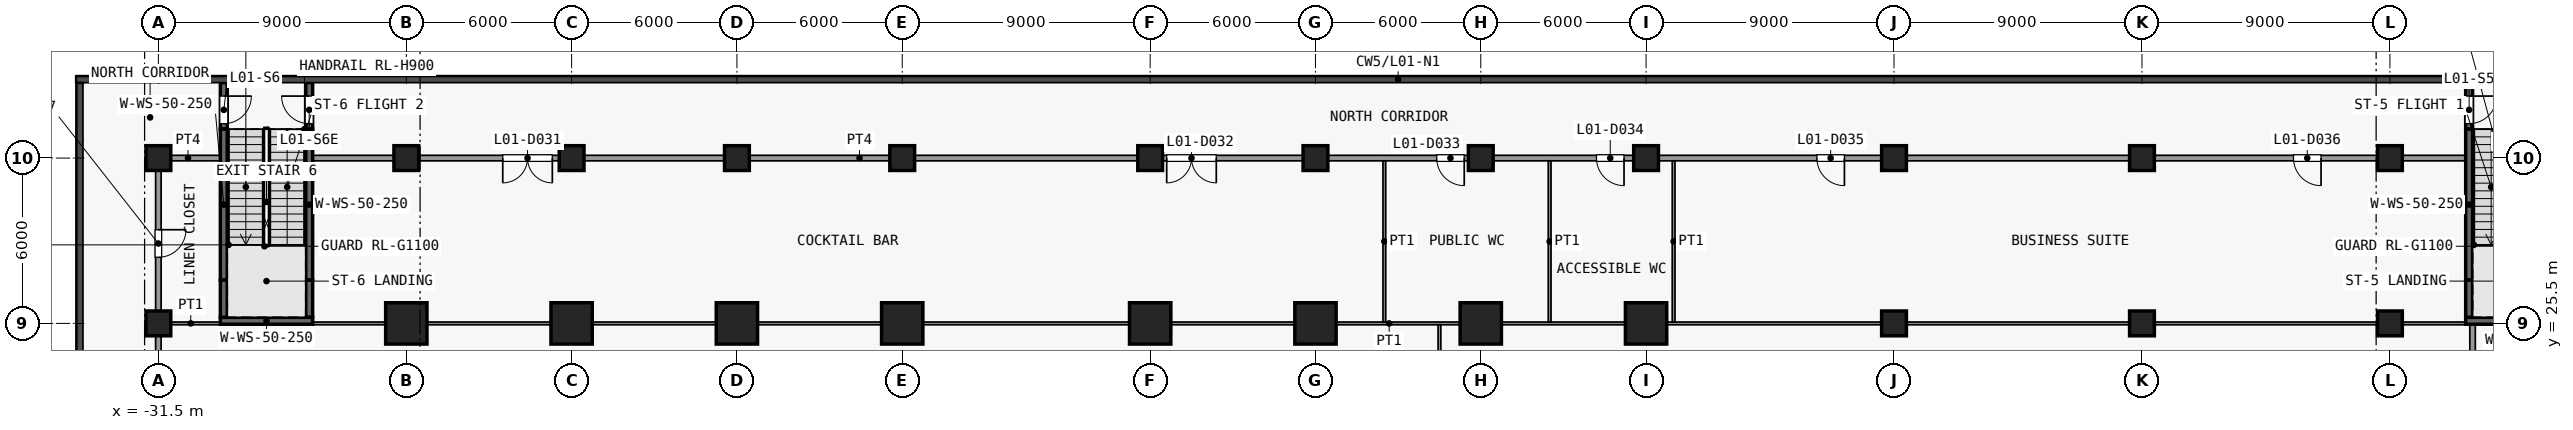
"""IFC4 building model, lengths in metres.
Left out: names, types, materials, properties, quantities, classifications, styles, units other than length and angle.
Written with IfcOpenShell. Run it as: python <this file> out.ifc"""

import sys

from ifc_helpers import new_model, si_unit, direction, frame, frame_2d, origin, origin_2d, place, context, subcontext, project, spatial, rectangle, extrude, element, fill, save


model = new_model("IFC4")
c1 = context("Model", 3, precision=1e-05, world=origin(), true_north=direction((0.0, 1.0)))
c2 = subcontext(c1, "Body", "Model", "MODEL_VIEW")
j1 = project(units=[si_unit("LENGTHUNIT", "METRE"), si_unit("PLANEANGLEUNIT", "RADIAN")], contexts=[c1])
p1 = place(None, origin())
s1 = spatial("IfcSite", under=j1, at=p1, CompositionType="ELEMENT")
p2 = place(p1, origin())
s2 = spatial("IfcBuilding", under=s1, at=p2, CompositionType="ELEMENT")
p3 = place(p2, frame((0.0, 0.0, 8.0)))
s3 = spatial("IfcBuildingStorey", under=s2, at=p3, CompositionType="ELEMENT", Elevation=8.0)
for number, where, z_axis, x_axis in (
    (1, (-31.5, 25.5, 0.0), (0.0, 0.0, 1.0), (1.0, 0.0, 0.0)),
    (2, (-31.5, 31.5, 0.0), (0.0, 0.0, 1.0), (1.0, 0.0, 0.0)),
):
    element("IfcColumn", number, at=place(p3, frame(where, z_axis=z_axis, x_axis=x_axis)), inside=s3, PredefinedType="COLUMN", context=c2, shape_type="SweptSolid", body=[
        extrude(rectangle(XDim=0.9, YDim=0.9, at=origin_2d()), origin(), (0.0, 0.0, 1.0), 5.5),
    ])
p4 = place(p3, frame((-22.5, 25.5, 0.0), z_axis=(0.0, 0.0, 1.0), x_axis=(1.0, 0.0, 0.0)))
e3 = element("IfcColumn", 3, at=p4, inside=s3, PredefinedType="COLUMN", context=c2, shape_type="SweptSolid", body=[
    extrude(rectangle(XDim=1.5, YDim=1.5, at=origin_2d()), origin(), (0.0, 0.0, 1.0), 5.5),
])
p5 = place(p3, frame((-22.5, 31.5, 0.0), z_axis=(0.0, 0.0, 1.0), x_axis=(1.0, 0.0, 0.0)))
e4 = element("IfcColumn", 4, at=p5, inside=s3, PredefinedType="COLUMN", context=c2, shape_type="SweptSolid", body=[
    extrude(rectangle(XDim=0.9, YDim=0.9, at=origin_2d()), origin(), (0.0, 0.0, 1.0), 5.5),
])
p6 = place(p3, frame((-16.5, 25.5, 0.0), z_axis=(0.0, 0.0, 1.0), x_axis=(1.0, 0.0, 0.0)))
e5 = element("IfcColumn", 5, at=p6, inside=s3, PredefinedType="COLUMN", context=c2, shape_type="SweptSolid", body=[
    extrude(rectangle(XDim=1.5, YDim=1.5, at=origin_2d()), origin(), (0.0, 0.0, 1.0), 5.5),
])
p7 = place(p3, frame((-16.5, 31.5, 0.0), z_axis=(0.0, 0.0, 1.0), x_axis=(1.0, 0.0, 0.0)))
e6 = element("IfcColumn", 6, at=p7, inside=s3, PredefinedType="COLUMN", context=c2, shape_type="SweptSolid", body=[
    extrude(rectangle(XDim=0.9, YDim=0.9, at=origin_2d()), origin(), (0.0, 0.0, 1.0), 5.5),
])
p8 = place(p3, frame((-10.5, 25.5, 0.0), z_axis=(0.0, 0.0, 1.0), x_axis=(1.0, 0.0, 0.0)))
e7 = element("IfcColumn", 7, at=p8, inside=s3, PredefinedType="COLUMN", context=c2, shape_type="SweptSolid", body=[
    extrude(rectangle(XDim=1.5, YDim=1.5, at=origin_2d()), origin(), (0.0, 0.0, 1.0), 5.5),
])
p9 = place(p3, frame((-10.5, 31.5, 0.0), z_axis=(0.0, 0.0, 1.0), x_axis=(1.0, 0.0, 0.0)))
e8 = element("IfcColumn", 8, at=p9, inside=s3, PredefinedType="COLUMN", context=c2, shape_type="SweptSolid", body=[
    extrude(rectangle(XDim=0.9, YDim=0.9, at=origin_2d()), origin(), (0.0, 0.0, 1.0), 5.5),
])
p10 = place(p3, frame((-4.5, 25.5, 0.0), z_axis=(0.0, 0.0, 1.0), x_axis=(1.0, 0.0, 0.0)))
e9 = element("IfcColumn", 9, at=p10, inside=s3, PredefinedType="COLUMN", context=c2, shape_type="SweptSolid", body=[
    extrude(rectangle(XDim=1.5, YDim=1.5, at=origin_2d()), origin(), (0.0, 0.0, 1.0), 5.5),
])
p11 = place(p3, frame((-4.5, 31.5, 0.0), z_axis=(0.0, 0.0, 1.0), x_axis=(1.0, 0.0, 0.0)))
e10 = element("IfcColumn", 10, at=p11, inside=s3, PredefinedType="COLUMN", context=c2, shape_type="SweptSolid", body=[
    extrude(rectangle(XDim=0.9, YDim=0.9, at=origin_2d()), origin(), (0.0, 0.0, 1.0), 5.5),
])
p12 = place(p3, frame((4.5, 25.5, 0.0), z_axis=(0.0, 0.0, 1.0), x_axis=(1.0, 0.0, 0.0)))
e11 = element("IfcColumn", 11, at=p12, inside=s3, PredefinedType="COLUMN", context=c2, shape_type="SweptSolid", body=[
    extrude(rectangle(XDim=1.5, YDim=1.5, at=origin_2d()), origin(), (0.0, 0.0, 1.0), 5.5),
])
p13 = place(p3, frame((4.5, 31.5, 0.0), z_axis=(0.0, 0.0, 1.0), x_axis=(1.0, 0.0, 0.0)))
e12 = element("IfcColumn", 12, at=p13, inside=s3, PredefinedType="COLUMN", context=c2, shape_type="SweptSolid", body=[
    extrude(rectangle(XDim=0.9, YDim=0.9, at=origin_2d()), origin(), (0.0, 0.0, 1.0), 5.5),
])
p14 = place(p3, frame((10.5, 25.5, 0.0), z_axis=(0.0, 0.0, 1.0), x_axis=(1.0, 0.0, 0.0)))
e13 = element("IfcColumn", 13, at=p14, inside=s3, PredefinedType="COLUMN", context=c2, shape_type="SweptSolid", body=[
    extrude(rectangle(XDim=1.5, YDim=1.5, at=origin_2d()), origin(), (0.0, 0.0, 1.0), 5.5),
])
p15 = place(p3, frame((10.5, 31.5, 0.0), z_axis=(0.0, 0.0, 1.0), x_axis=(1.0, 0.0, 0.0)))
e14 = element("IfcColumn", 14, at=p15, inside=s3, PredefinedType="COLUMN", context=c2, shape_type="SweptSolid", body=[
    extrude(rectangle(XDim=0.9, YDim=0.9, at=origin_2d()), origin(), (0.0, 0.0, 1.0), 5.5),
])
p16 = place(p3, frame((16.5, 25.5, 0.0), z_axis=(0.0, 0.0, 1.0), x_axis=(1.0, 0.0, 0.0)))
e15 = element("IfcColumn", 15, at=p16, inside=s3, PredefinedType="COLUMN", context=c2, shape_type="SweptSolid", body=[
    extrude(rectangle(XDim=1.5, YDim=1.5, at=origin_2d()), origin(), (0.0, 0.0, 1.0), 5.5),
])
p17 = place(p3, frame((16.5, 31.5, 0.0), z_axis=(0.0, 0.0, 1.0), x_axis=(1.0, 0.0, 0.0)))
e16 = element("IfcColumn", 16, at=p17, inside=s3, PredefinedType="COLUMN", context=c2, shape_type="SweptSolid", body=[
    extrude(rectangle(XDim=0.9, YDim=0.9, at=origin_2d()), origin(), (0.0, 0.0, 1.0), 5.5),
])
p18 = place(p3, frame((22.5, 25.5, 0.0), z_axis=(0.0, 0.0, 1.0), x_axis=(1.0, 0.0, 0.0)))
e17 = element("IfcColumn", 17, at=p18, inside=s3, PredefinedType="COLUMN", context=c2, shape_type="SweptSolid", body=[
    extrude(rectangle(XDim=1.5, YDim=1.5, at=origin_2d()), origin(), (0.0, 0.0, 1.0), 5.5),
])
for number, where, z_axis, x_axis in (
    (18, (22.5, 31.5, 0.0), (0.0, 0.0, 1.0), (1.0, 0.0, 0.0)),
    (19, (31.5, 25.5, 0.0), (0.0, 0.0, 1.0), (1.0, 0.0, 0.0)),
    (20, (31.5, 31.5, 0.0), (0.0, 0.0, 1.0), (1.0, 0.0, 0.0)),
    (21, (40.5, 25.5, 0.0), (0.0, 0.0, 1.0), (1.0, 0.0, 0.0)),
    (22, (40.5, 31.5, 0.0), (0.0, 0.0, 1.0), (1.0, 0.0, 0.0)),
    (23, (49.5, 25.5, 0.0), (0.0, 0.0, 1.0), (1.0, 0.0, 0.0)),
    (24, (49.5, 31.5, 0.0), (0.0, 0.0, 1.0), (1.0, 0.0, 0.0)),
):
    element("IfcColumn", number, at=place(p3, frame(where, z_axis=z_axis, x_axis=x_axis)), inside=s3, PredefinedType="COLUMN", context=c2, shape_type="SweptSolid", body=[
        extrude(rectangle(XDim=0.9, YDim=0.9, at=origin_2d()), origin(), (0.0, 0.0, 1.0), 5.5),
    ])
p19 = place(p3, frame((52.375, 34.24, 0.0), z_axis=(0.0, 0.0, 1.0), x_axis=(0.0, -1.0, 0.0)))
e25 = element("IfcWall", 25, at=p19, inside=s3, PredefinedType="SHEAR", context=c2, shape_type="SweptSolid", body=[
    extrude(rectangle(XDim=1.69, YDim=0.25, at=frame_2d((0.845, 0.0))), origin(), (0.0, 0.0, 1.0), 5.15),
])
p20 = place(p19, frame((0.49, 0.0, 0.0)))
e26 = element("IfcOpeningElement", 26, at=p20, cuts=e25, PredefinedType="OPENING", context=c2, shape_type="SweptSolid", body=[
    extrude(rectangle(XDim=1.0, YDim=2.1, at=frame_2d((0.5, 1.05))), frame((0.0, 0.135, 0.0), z_axis=(0.0, -1.0, 0.0), x_axis=(1.0, 0.0, 0.0)), (0.0, 0.0, 1.0), 0.27),
])
p21 = place(p3, frame((52.375, 27.07, 0.0), z_axis=(0.0, 0.0, 1.0), x_axis=(0.0, 1.0, 0.0)))
e27 = element("IfcWall", 27, at=p21, inside=s3, PredefinedType="SHEAR", context=c2, shape_type="SweptSolid", body=[
    extrude(rectangle(XDim=5.48, YDim=0.25, at=frame_2d((2.74, 0.0))), origin(), (0.0, 0.0, 1.0), 5.15),
])
p22 = place(p3, frame((52.375, 25.72, 0.0), z_axis=(0.0, 0.0, 1.0), x_axis=(0.0, 1.0, 0.0)))
e28 = element("IfcWall", 28, at=p22, inside=s3, PredefinedType="SHEAR", context=c2, shape_type="SweptSolid", body=[
    extrude(rectangle(XDim=1.35, YDim=0.25, at=frame_2d((0.675, 0.0))), origin(), (0.0, 0.0, 1.0), 5.15),
])
p23 = place(p3, frame((52.25, 25.595, 0.0), z_axis=(0.0, 0.0, 1.0), x_axis=(1.0, 0.0, 0.0)))
e29 = element("IfcWall", 29, at=p23, inside=s3, PredefinedType="SHEAR", context=c2, shape_type="SweptSolid", body=[
    extrude(rectangle(XDim=3.35, YDim=0.25, at=frame_2d((1.675, 0.0))), origin(), (0.0, 0.0, 1.0), 5.15),
])
p24 = place(p3, frame((-29.125, 34.24, 0.0), z_axis=(0.0, 0.0, 1.0), x_axis=(0.0, -1.0, 0.0)))
e30 = element("IfcWall", 30, at=p24, inside=s3, PredefinedType="SHEAR", context=c2, shape_type="SweptSolid", body=[
    extrude(rectangle(XDim=1.69, YDim=0.25, at=frame_2d((0.845, 0.0))), origin(), (0.0, 0.0, 1.0), 5.15),
])
p25 = place(p24, frame((0.49, 0.0, 0.0)))
e31 = element("IfcOpeningElement", 31, at=p25, cuts=e30, PredefinedType="OPENING", context=c2, shape_type="SweptSolid", body=[
    extrude(rectangle(XDim=1.0, YDim=2.1, at=frame_2d((0.5, 1.05))), frame((0.0, 0.135, 0.0), z_axis=(0.0, -1.0, 0.0), x_axis=(1.0, 0.0, 0.0)), (0.0, 0.0, 1.0), 0.27),
])
p26 = place(p3, frame((-29.125, 27.07, 0.0), z_axis=(0.0, 0.0, 1.0), x_axis=(0.0, 1.0, 0.0)))
e32 = element("IfcWall", 32, at=p26, inside=s3, PredefinedType="SHEAR", context=c2, shape_type="SweptSolid", body=[
    extrude(rectangle(XDim=5.48, YDim=0.25, at=frame_2d((2.74, 0.0))), origin(), (0.0, 0.0, 1.0), 5.15),
])
p27 = place(p3, frame((-29.125, 25.72, 0.0), z_axis=(0.0, 0.0, 1.0), x_axis=(0.0, 1.0, 0.0)))
e33 = element("IfcWall", 33, at=p27, inside=s3, PredefinedType="SHEAR", context=c2, shape_type="SweptSolid", body=[
    extrude(rectangle(XDim=1.35, YDim=0.25, at=frame_2d((0.675, 0.0))), origin(), (0.0, 0.0, 1.0), 5.15),
])
p28 = place(p3, frame((-26.025, 32.55, 0.0), z_axis=(0.0, 0.0, 1.0), x_axis=(0.0, 1.0, 0.0)))
e34 = element("IfcWall", 34, at=p28, inside=s3, PredefinedType="SHEAR", context=c2, shape_type="SweptSolid", body=[
    extrude(rectangle(XDim=1.69, YDim=0.25, at=frame_2d((0.845, 0.0))), origin(), (0.0, 0.0, 1.0), 5.15),
])
p29 = place(p28, frame((0.2, 0.0, 0.0)))
e35 = element("IfcOpeningElement", 35, at=p29, cuts=e34, PredefinedType="OPENING", context=c2, shape_type="SweptSolid", body=[
    extrude(rectangle(XDim=1.0, YDim=2.1, at=frame_2d((0.5, 1.05))), frame((0.0, 0.135, 0.0), z_axis=(0.0, -1.0, 0.0), x_axis=(1.0, 0.0, 0.0)), (0.0, 0.0, 1.0), 0.27),
])
p30 = place(p3, frame((-26.025, 27.07, 0.0), z_axis=(0.0, 0.0, 1.0), x_axis=(0.0, 1.0, 0.0)))
e36 = element("IfcWall", 36, at=p30, inside=s3, PredefinedType="SHEAR", context=c2, shape_type="SweptSolid", body=[
    extrude(rectangle(XDim=5.48, YDim=0.25, at=frame_2d((2.74, 0.0))), origin(), (0.0, 0.0, 1.0), 5.15),
])
p31 = place(p3, frame((-26.025, 25.72, 0.0), z_axis=(0.0, 0.0, 1.0), x_axis=(0.0, 1.0, 0.0)))
e37 = element("IfcWall", 37, at=p31, inside=s3, PredefinedType="SHEAR", context=c2, shape_type="SweptSolid", body=[
    extrude(rectangle(XDim=1.35, YDim=0.25, at=frame_2d((0.675, 0.0))), origin(), (0.0, 0.0, 1.0), 5.15),
])
p32 = place(p3, frame((-29.25, 25.595, 0.0), z_axis=(0.0, 0.0, 1.0), x_axis=(1.0, 0.0, 0.0)))
e38 = element("IfcWall", 38, at=p32, inside=s3, PredefinedType="SHEAR", context=c2, shape_type="SweptSolid", body=[
    extrude(rectangle(XDim=3.35, YDim=0.25, at=frame_2d((1.675, 0.0))), origin(), (0.0, 0.0, 1.0), 5.15),
])
p33 = place(p3, frame((-31.4, 25.5, 0.0), z_axis=(0.0, 0.0, 1.0), x_axis=(1.0, 0.0, 0.0)))
e39 = element("IfcWall", 39, at=p33, inside=s3, PredefinedType="PARTITIONING", context=c2, shape_type="SweptSolid", body=[
    extrude(rectangle(XDim=2.15, YDim=0.1, at=frame_2d((1.075, 0.0))), origin(), (0.0, 0.0, 1.0), 5.15),
])
p34 = place(p3, frame((-25.9, 25.5, 0.0), z_axis=(0.0, 0.0, 1.0), x_axis=(1.0, 0.0, 0.0)))
e40 = element("IfcWall", 40, at=p34, inside=s3, PredefinedType="PARTITIONING", context=c2, shape_type="SweptSolid", body=[
    extrude(rectangle(XDim=78.15, YDim=0.1, at=frame_2d((39.075, 0.0))), origin(), (0.0, 0.0, 1.0), 5.15),
])
p35 = place(p3, frame((-31.6, 31.5, 0.0), z_axis=(0.0, 0.0, 1.0), x_axis=(1.0, 0.0, 0.0)))
e41 = element("IfcWall", 41, at=p35, inside=s3, PredefinedType="PARTITIONING", context=c2, shape_type="SweptSolid", body=[
    extrude(rectangle(XDim=2.35, YDim=0.2, at=frame_2d((1.175, 0.0))), origin(), (0.0, 0.0, 1.0), 5.15),
])
p36 = place(p3, frame((-25.9, 31.5, 0.0), z_axis=(0.0, 0.0, 1.0), x_axis=(1.0, 0.0, 0.0)))
e42 = element("IfcWall", 42, at=p36, inside=s3, PredefinedType="PARTITIONING", context=c2, shape_type="SweptSolid", body=[
    extrude(rectangle(XDim=78.15, YDim=0.2, at=frame_2d((39.075, 0.0))), origin(), (0.0, 0.0, 1.0), 5.15),
])
p37 = place(p36, frame((6.9, 0.0, 0.0)))
e43 = element("IfcOpeningElement", 43, at=p37, cuts=e42, PredefinedType="OPENING", context=c2, shape_type="SweptSolid", body=[
    extrude(rectangle(XDim=1.8, YDim=2.1, at=frame_2d((0.9, 1.05))), frame((0.0, 0.11, 0.0), z_axis=(0.0, -1.0, 0.0), x_axis=(1.0, 0.0, 0.0)), (0.0, 0.0, 1.0), 0.22),
])
p38 = place(p36, frame((31.0, 0.0, 0.0)))
e44 = element("IfcOpeningElement", 44, at=p38, cuts=e42, PredefinedType="OPENING", context=c2, shape_type="SweptSolid", body=[
    extrude(rectangle(XDim=1.8, YDim=2.1, at=frame_2d((0.9, 1.05))), frame((0.0, 0.11, 0.0), z_axis=(0.0, -1.0, 0.0), x_axis=(1.0, 0.0, 0.0)), (0.0, 0.0, 1.0), 0.22),
])
p39 = place(p36, frame((40.8, 0.0, 0.0)))
e45 = element("IfcOpeningElement", 45, at=p39, cuts=e42, PredefinedType="OPENING", context=c2, shape_type="SweptSolid", body=[
    extrude(rectangle(XDim=1.0, YDim=2.1, at=frame_2d((0.5, 1.05))), frame((0.0, 0.11, 0.0), z_axis=(0.0, -1.0, 0.0), x_axis=(1.0, 0.0, 0.0)), (0.0, 0.0, 1.0), 0.22),
])
p40 = place(p36, frame((46.6, 0.0, 0.0)))
e46 = element("IfcOpeningElement", 46, at=p40, cuts=e42, PredefinedType="OPENING", context=c2, shape_type="SweptSolid", body=[
    extrude(rectangle(XDim=1.0, YDim=2.1, at=frame_2d((0.5, 1.05))), frame((0.0, 0.11, 0.0), z_axis=(0.0, -1.0, 0.0), x_axis=(1.0, 0.0, 0.0)), (0.0, 0.0, 1.0), 0.22),
])
p41 = place(p36, frame((54.6, 0.0, 0.0)))
e47 = element("IfcOpeningElement", 47, at=p41, cuts=e42, PredefinedType="OPENING", context=c2, shape_type="SweptSolid", body=[
    extrude(rectangle(XDim=1.0, YDim=2.1, at=frame_2d((0.5, 1.05))), frame((0.0, 0.11, 0.0), z_axis=(0.0, -1.0, 0.0), x_axis=(1.0, 0.0, 0.0)), (0.0, 0.0, 1.0), 0.22),
])
p42 = place(p36, frame((71.9, 0.0, 0.0)))
e48 = element("IfcOpeningElement", 48, at=p42, cuts=e42, PredefinedType="OPENING", context=c2, shape_type="SweptSolid", body=[
    extrude(rectangle(XDim=1.0, YDim=2.1, at=frame_2d((0.5, 1.05))), frame((0.0, 0.11, 0.0), z_axis=(0.0, -1.0, 0.0), x_axis=(1.0, 0.0, 0.0)), (0.0, 0.0, 1.0), 0.22),
])
p43 = place(p3, frame((-31.5, 19.6, 0.0), z_axis=(0.0, 0.0, 1.0), x_axis=(0.0, 1.0, 0.0)))
e49 = element("IfcWall", 49, at=p43, inside=s3, PredefinedType="PARTITIONING", context=c2, shape_type="SweptSolid", body=[
    extrude(rectangle(XDim=11.8, YDim=0.2, at=frame_2d((5.9, 0.0))), origin(), (0.0, 0.0, 1.0), 5.15),
])
p44 = place(p43, frame((8.3, 0.0, 0.0)))
e50 = element("IfcOpeningElement", 50, at=p44, cuts=e49, PredefinedType="OPENING", context=c2, shape_type="SweptSolid", body=[
    extrude(rectangle(XDim=1.0, YDim=2.1, at=frame_2d((0.5, 1.05))), frame((0.0, 0.11, 0.0), z_axis=(0.0, -1.0, 0.0), x_axis=(1.0, 0.0, 0.0)), (0.0, 0.0, 1.0), 0.22),
])
for number, where, z_axis, x_axis in (
    (51, (13.0, 25.55, 0.0), (0.0, 0.0, 1.0), (0.0, 1.0, 0.0)),
    (52, (15.0, 19.6, 0.0), (0.0, 0.0, 1.0), (0.0, 1.0, 0.0)),
    (53, (19.0, 25.55, 0.0), (0.0, 0.0, 1.0), (0.0, 1.0, 0.0)),
    (54, (23.5, 25.55, 0.0), (0.0, 0.0, 1.0), (0.0, 1.0, 0.0)),
):
    element("IfcWall", number, at=place(p3, frame(where, z_axis=z_axis, x_axis=x_axis)), inside=s3, PredefinedType="PARTITIONING", context=c2, shape_type="SweptSolid", body=[
        extrude(rectangle(XDim=5.85, YDim=0.1, at=frame_2d((2.925, 0.0))), origin(), (0.0, 0.0, 1.0), 5.15),
    ])
p45 = place(p3, frame((52.5, 16.6, 0.0), z_axis=(0.0, 0.0, 1.0), x_axis=(0.0, 1.0, 0.0)))
e55 = element("IfcWall", 55, at=p45, inside=s3, PredefinedType="PARTITIONING", context=c2, shape_type="SweptSolid", body=[
    extrude(rectangle(XDim=8.87, YDim=0.2, at=frame_2d((4.435, 0.0))), origin(), (0.0, 0.0, 1.0), 5.15),
])
p46 = place(p45, frame((0.9, 0.0, 0.0)))
e56 = element("IfcOpeningElement", 56, at=p46, cuts=e55, PredefinedType="OPENING", context=c2, shape_type="SweptSolid", body=[
    extrude(rectangle(XDim=1.0, YDim=2.1, at=frame_2d((0.5, 1.05))), frame((0.0, 0.11, 0.0), z_axis=(0.0, -1.0, 0.0), x_axis=(1.0, 0.0, 0.0)), (0.0, 0.0, 1.0), 0.22),
])
p47 = place(p45, frame((5.4, 0.0, 0.0)))
e57 = element("IfcOpeningElement", 57, at=p47, cuts=e55, PredefinedType="OPENING", context=c2, shape_type="SweptSolid", body=[
    extrude(rectangle(XDim=1.0, YDim=2.1, at=frame_2d((0.5, 1.05))), frame((0.0, 0.11, 0.0), z_axis=(0.0, -1.0, 0.0), x_axis=(1.0, 0.0, 0.0)), (0.0, 0.0, 1.0), 0.22),
])
p48 = place(p20, origin())
e58 = element("IfcDoor", 58, at=p48, inside=s3, OperationType="SINGLE_SWING_LEFT", PredefinedType="DOOR", context=c2, shape_type="SweptSolid", body=[
    extrude(rectangle(XDim=1.0, YDim=2.1, at=frame_2d((0.5, 1.05))), frame((0.0, 0.025, 0.0), z_axis=(0.0, -1.0, 0.0), x_axis=(1.0, 0.0, 0.0)), (0.0, 0.0, 1.0), 0.05),
])
fill(e26, e58)
p49 = place(p25, origin())
e59 = element("IfcDoor", 59, at=p49, inside=s3, OperationType="SINGLE_SWING_LEFT", PredefinedType="DOOR", context=c2, shape_type="SweptSolid", body=[
    extrude(rectangle(XDim=1.0, YDim=2.1, at=frame_2d((0.5, 1.05))), frame((0.0, 0.025, 0.0), z_axis=(0.0, -1.0, 0.0), x_axis=(1.0, 0.0, 0.0)), (0.0, 0.0, 1.0), 0.05),
])
fill(e31, e59)
p50 = place(p29, origin())
e60 = element("IfcDoor", 60, at=p50, inside=s3, OperationType="SINGLE_SWING_RIGHT", PredefinedType="DOOR", context=c2, shape_type="SweptSolid", body=[
    extrude(rectangle(XDim=1.0, YDim=2.1, at=frame_2d((0.5, 1.05))), frame((0.0, 0.025, 0.0), z_axis=(0.0, -1.0, 0.0), x_axis=(1.0, 0.0, 0.0)), (0.0, 0.0, 1.0), 0.05),
])
fill(e35, e60)
p51 = place(p37, origin())
e61 = element("IfcDoor", 61, at=p51, inside=s3, OperationType="DOUBLE_DOOR_SINGLE_SWING", PredefinedType="DOOR", context=c2, shape_type="SweptSolid", body=[
    extrude(rectangle(XDim=1.8, YDim=2.1, at=frame_2d((0.9, 1.05))), frame((0.0, 0.025, 0.0), z_axis=(0.0, -1.0, 0.0), x_axis=(1.0, 0.0, 0.0)), (0.0, 0.0, 1.0), 0.05),
])
fill(e43, e61)
p52 = place(p38, origin())
e62 = element("IfcDoor", 62, at=p52, inside=s3, OperationType="DOUBLE_DOOR_SINGLE_SWING", PredefinedType="DOOR", context=c2, shape_type="SweptSolid", body=[
    extrude(rectangle(XDim=1.8, YDim=2.1, at=frame_2d((0.9, 1.05))), frame((0.0, 0.025, 0.0), z_axis=(0.0, -1.0, 0.0), x_axis=(1.0, 0.0, 0.0)), (0.0, 0.0, 1.0), 0.05),
])
fill(e44, e62)
p53 = place(p39, origin())
e63 = element("IfcDoor", 63, at=p53, inside=s3, OperationType="SINGLE_SWING_RIGHT", PredefinedType="DOOR", context=c2, shape_type="SweptSolid", body=[
    extrude(rectangle(XDim=1.0, YDim=2.1, at=frame_2d((0.5, 1.05))), frame((0.0, 0.025, 0.0), z_axis=(0.0, -1.0, 0.0), x_axis=(1.0, 0.0, 0.0)), (0.0, 0.0, 1.0), 0.05),
])
fill(e45, e63)
p54 = place(p40, origin())
e64 = element("IfcDoor", 64, at=p54, inside=s3, OperationType="SINGLE_SWING_RIGHT", PredefinedType="DOOR", context=c2, shape_type="SweptSolid", body=[
    extrude(rectangle(XDim=1.0, YDim=2.1, at=frame_2d((0.5, 1.05))), frame((0.0, 0.025, 0.0), z_axis=(0.0, -1.0, 0.0), x_axis=(1.0, 0.0, 0.0)), (0.0, 0.0, 1.0), 0.05),
])
fill(e46, e64)
p55 = place(p41, origin())
e65 = element("IfcDoor", 65, at=p55, inside=s3, OperationType="SINGLE_SWING_RIGHT", PredefinedType="DOOR", context=c2, shape_type="SweptSolid", body=[
    extrude(rectangle(XDim=1.0, YDim=2.1, at=frame_2d((0.5, 1.05))), frame((0.0, 0.025, 0.0), z_axis=(0.0, -1.0, 0.0), x_axis=(1.0, 0.0, 0.0)), (0.0, 0.0, 1.0), 0.05),
])
fill(e47, e65)
p56 = place(p42, origin())
e66 = element("IfcDoor", 66, at=p56, inside=s3, OperationType="SINGLE_SWING_RIGHT", PredefinedType="DOOR", context=c2, shape_type="SweptSolid", body=[
    extrude(rectangle(XDim=1.0, YDim=2.1, at=frame_2d((0.5, 1.05))), frame((0.0, 0.025, 0.0), z_axis=(0.0, -1.0, 0.0), x_axis=(1.0, 0.0, 0.0)), (0.0, 0.0, 1.0), 0.05),
])
fill(e48, e66)
p57 = place(p44, origin())
e67 = element("IfcDoor", 67, at=p57, inside=s3, OperationType="SINGLE_SWING_RIGHT", PredefinedType="DOOR", context=c2, shape_type="SweptSolid", body=[
    extrude(rectangle(XDim=1.0, YDim=2.1, at=frame_2d((0.5, 1.05))), frame((0.0, 0.025, 0.0), z_axis=(0.0, -1.0, 0.0), x_axis=(1.0, 0.0, 0.0)), (0.0, 0.0, 1.0), 0.05),
])
fill(e50, e67)
save(model, sys.argv[1])
